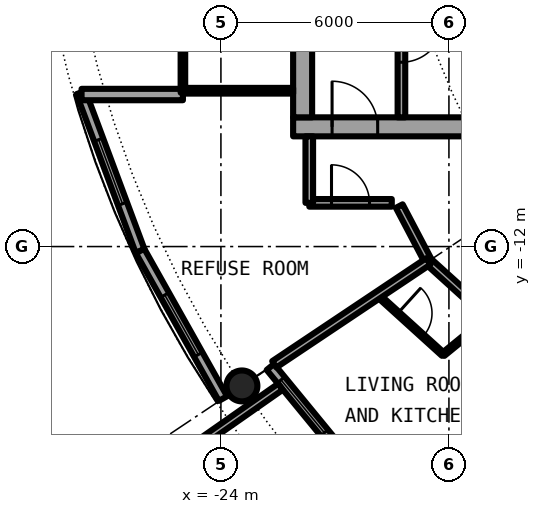
"""IFC4 building model, lengths in metres.
Left out: names, types, materials, properties, quantities, classifications, styles, units other than length and angle.
Written with IfcOpenShell. Run it as: python <this file> out.ifc"""

import sys

from ifc_helpers import new_model, si_unit, direction, frame, frame_2d, origin, origin_2d, place, context, subcontext, project, spatial, rectangle, hollow_circle, extrude, element, fill, save


model = new_model("IFC4")
c1 = context("Model", 3, precision=1e-05, world=origin(), true_north=direction((0.0, 1.0)))
c2 = subcontext(c1, "Body", "Model", "MODEL_VIEW")
j1 = project(units=[si_unit("LENGTHUNIT", "METRE"), si_unit("PLANEANGLEUNIT", "RADIAN")], contexts=[c1])
p1 = place(None, origin())
s1 = spatial("IfcSite", under=j1, at=p1, CompositionType="ELEMENT")
p2 = place(p1, origin())
s2 = spatial("IfcBuilding", under=s1, at=p2, CompositionType="ELEMENT")
p3 = place(p2, frame((0.0, 0.0, 145.2)))
s3 = spatial("IfcBuildingStorey", under=s2, at=p3, CompositionType="ELEMENT", Elevation=145.2)
p4 = place(p3, frame((-23.448, -15.667, 0.0), z_axis=(0.0, 0.0, 1.0), x_axis=(1.0, 0.0, 0.0)))
e1 = element("IfcColumn", 1, at=p4, inside=s3, PredefinedType="COLUMN", context=c2, shape_type="SweptSolid", body=[
    extrude(hollow_circle(Radius=0.406, WallThickness=0.04, at=origin_2d()), origin(), (0.0, 0.0, 1.0), 3.05),
])
p5 = place(p3, frame((-22.699, -15.167, 0.0), z_axis=(0.0, 0.0, 1.0), x_axis=(0.634382322723, -0.773019449054, 0.0)))
e2 = element("IfcWall", 2, at=p5, inside=s3, PredefinedType="SOLIDWALL", context=c2, shape_type="SweptSolid", body=[
    extrude(rectangle(XDim=5.352, YDim=0.25, at=frame_2d((2.676, 0.0))), origin(), (0.0, 0.0, 1.0), 2.7),
])
p6 = place(p5, frame((0.441, 0.0, 0.3)))
e3 = element("IfcOpeningElement", 3, at=p6, cuts=e2, PredefinedType="OPENING", context=c2, shape_type="SweptSolid", body=[
    extrude(rectangle(XDim=1.8, YDim=2.1, at=frame_2d((0.9, 1.05))), frame((0.0, 0.135, 0.0), z_axis=(0.0, -1.0, 0.0), x_axis=(1.0, 0.0, 0.0)), (0.0, 0.0, 1.0), 0.27),
])
p7 = place(p5, frame((3.51, 0.0, 0.0)))
e4 = element("IfcOpeningElement", 4, at=p7, cuts=e2, PredefinedType="OPENING", context=c2, shape_type="SweptSolid", body=[
    extrude(rectangle(XDim=1.0, YDim=2.2, at=frame_2d((0.5, 1.1))), frame((0.0, 0.135, 0.0), z_axis=(0.0, -1.0, 0.0), x_axis=(1.0, 0.0, 0.0)), (0.0, 0.0, 1.0), 0.27),
])
p8 = place(p3, frame((-22.433, -15.688, -0.03), z_axis=(0.0, 0.0, 1.0), x_axis=(-0.819373043115, -0.573260687834, 0.0)))
e5 = element("IfcWall", 5, at=p8, inside=s3, PredefinedType="SOLIDWALL", context=c2, shape_type="SweptSolid", body=[
    extrude(rectangle(XDim=2.925, YDim=0.2, at=frame_2d((1.463, 0.0))), origin(), (0.0, 0.0, 1.0), 2.73),
])
p9 = place(p3, frame((-27.682, -7.945, 0.0), z_axis=(0.0, 0.0, 1.0), x_axis=(0.349247811493, -0.937030397675, 0.0)))
e6 = element("IfcWall", 6, at=p9, inside=s3, PredefinedType="SOLIDWALL", context=c2, shape_type="SweptSolid", body=[
    extrude(rectangle(XDim=4.452, YDim=0.25, at=frame_2d((2.226, 0.0))), origin(), (0.0, 0.0, 1.0), 2.7),
])
p10 = place(p9, frame((1.327, 0.0, 0.3)))
e7 = element("IfcOpeningElement", 7, at=p10, cuts=e6, PredefinedType="OPENING", context=c2, shape_type="SweptSolid", body=[
    extrude(rectangle(XDim=1.8, YDim=2.1, at=frame_2d((0.9, 1.05))), frame((0.0, 0.135, 0.0), z_axis=(0.0, -1.0, 0.0), x_axis=(1.0, 0.0, 0.0)), (0.0, 0.0, 1.0), 0.27),
])
p11 = place(p3, frame((-26.127, -12.117, 0.0), z_axis=(0.0, 0.0, 1.0), x_axis=(0.489696356642, -0.871893042919, 0.0)))
e8 = element("IfcWall", 8, at=p11, inside=s3, PredefinedType="SOLIDWALL", context=c2, shape_type="SweptSolid", body=[
    extrude(rectangle(XDim=4.454, YDim=0.25, at=frame_2d((2.227, 0.0))), origin(), (0.0, 0.0, 1.0), 2.7),
])
p12 = place(p11, frame((1.327, 0.0, 0.3)))
e9 = element("IfcOpeningElement", 9, at=p12, cuts=e8, PredefinedType="OPENING", context=c2, shape_type="SweptSolid", body=[
    extrude(rectangle(XDim=1.8, YDim=2.1, at=frame_2d((0.9, 1.05))), frame((0.0, 0.135, 0.0), z_axis=(0.0, -1.0, 0.0), x_axis=(1.0, 0.0, 0.0)), (0.0, 0.0, 1.0), 0.27),
])
p13 = place(p3, frame((-25.0, -8.0, 0.0), z_axis=(0.0, 0.0, 1.0), x_axis=(-1.0, 0.0, 0.0)))
e10 = element("IfcWall", 10, at=p13, inside=s3, PredefinedType="SOLIDWALL", context=c2, shape_type="SweptSolid", body=[
    extrude(rectangle(XDim=2.667, YDim=0.3, at=frame_2d((1.333, 0.0))), origin(), (0.0, 0.0, 1.0), 2.7),
])
p14 = place(p3, frame((-22.1, -8.85, 0.0), z_axis=(0.0, 0.0, 1.0), x_axis=(1.0, 0.0, 0.0)))
e11 = element("IfcWall", 11, at=p14, inside=s3, PredefinedType="SHEAR", context=c2, shape_type="SweptSolid", body=[
    extrude(rectangle(XDim=13.6, YDim=0.5, at=frame_2d((6.8, 0.0))), origin(), (0.0, 0.0, 1.0), 3.05),
])
p15 = place(p14, frame((1.025, 0.0, 0.0)))
e12 = element("IfcOpeningElement", 12, at=p15, cuts=e11, PredefinedType="OPENING", context=c2, shape_type="SweptSolid", body=[
    extrude(rectangle(XDim=1.2, YDim=2.3, at=frame_2d((0.6, 1.15))), frame((0.0, 0.26, 0.0), z_axis=(0.0, -1.0, 0.0), x_axis=(1.0, 0.0, 0.0)), (0.0, 0.0, 1.0), 0.52),
])
p16 = place(p3, frame((-21.85, -8.6, 0.0), z_axis=(0.0, 0.0, 1.0), x_axis=(0.0, 1.0, 0.0)))
e13 = element("IfcWall", 13, at=p16, inside=s3, PredefinedType="SHEAR", context=c2, shape_type="SweptSolid", body=[
    extrude(rectangle(XDim=17.2, YDim=0.5, at=frame_2d((8.6, 0.0))), origin(), (0.0, 0.0, 1.0), 3.05),
])
p17 = place(p16, frame((7.7, 0.0, 0.0)))
e14 = element("IfcOpeningElement", 14, at=p17, cuts=e13, PredefinedType="OPENING", context=c2, shape_type="SweptSolid", body=[
    extrude(rectangle(XDim=1.8, YDim=2.3, at=frame_2d((0.9, 1.15))), frame((0.0, 0.26, 0.0), z_axis=(0.0, -1.0, 0.0), x_axis=(1.0, 0.0, 0.0)), (0.0, 0.0, 1.0), 0.52),
])
p18 = place(p3, frame((-19.25, -1.575, 0.0), z_axis=(0.0, 0.0, 1.0), x_axis=(0.0, -1.0, 0.0)))
e15 = element("IfcWall", 15, at=p18, inside=s3, PredefinedType="SOLIDWALL", context=c2, shape_type="SweptSolid", body=[
    extrude(rectangle(XDim=7.025, YDim=0.2, at=frame_2d((3.513, 0.0))), origin(), (0.0, 0.0, 1.0), 2.7),
])
p19 = place(p18, frame((4.475, 0.0, 0.0)))
e16 = element("IfcOpeningElement", 16, at=p19, cuts=e15, PredefinedType="OPENING", context=c2, shape_type="SweptSolid", body=[
    extrude(rectangle(XDim=1.1, YDim=2.3, at=frame_2d((0.55, 1.15))), frame((0.0, 0.11, 0.0), z_axis=(0.0, -1.0, 0.0), x_axis=(1.0, 0.0, 0.0)), (0.0, 0.0, 1.0), 0.22),
])
p20 = place(p3, frame((-22.1, -7.9, 0.0), z_axis=(0.0, 0.0, 1.0), x_axis=(-1.0, 0.0, 0.0)))
e17 = element("IfcWall", 17, at=p20, inside=s3, PredefinedType="PARTITIONING", context=c2, shape_type="SweptSolid", body=[
    extrude(rectangle(XDim=2.84, YDim=0.15, at=frame_2d((1.42, 0.0))), origin(), (0.0, 0.0, 1.0), 2.7),
])
p21 = place(p3, frame((-25.0, -7.95, 0.0), z_axis=(0.0, 0.0, 1.0), x_axis=(0.0, 1.0, 0.0)))
e18 = element("IfcWall", 18, at=p21, inside=s3, PredefinedType="PARTITIONING", context=c2, shape_type="SweptSolid", body=[
    extrude(rectangle(XDim=15.9, YDim=0.12, at=frame_2d((7.95, 0.0))), origin(), (0.0, 0.0, 1.0), 2.7),
])
p22 = place(p21, frame((6.75, 0.0, 0.0)))
e19 = element("IfcOpeningElement", 19, at=p22, cuts=e18, PredefinedType="OPENING", context=c2, shape_type="SweptSolid", body=[
    extrude(rectangle(XDim=2.4, YDim=2.3, at=frame_2d((1.2, 1.15))), frame((0.0, 0.07, 0.0), z_axis=(0.0, -1.0, 0.0), x_axis=(1.0, 0.0, 0.0)), (0.0, 0.0, 1.0), 0.14),
])
p23 = place(p21, frame((11.55, 0.0, 0.1)))
e20 = element("IfcOpeningElement", 20, at=p23, cuts=e18, PredefinedType="OPENING", context=c2, shape_type="SweptSolid", body=[
    extrude(rectangle(XDim=3.4, YDim=2.35, at=frame_2d((1.7, 1.175))), frame((0.0, 0.07, 0.0), z_axis=(0.0, -1.0, 0.0), x_axis=(1.0, 0.0, 0.0)), (0.0, 0.0, 1.0), 0.14),
])
p24 = place(p21, frame((0.95, 0.0, 0.1)))
e21 = element("IfcOpeningElement", 21, at=p24, cuts=e18, PredefinedType="OPENING", context=c2, shape_type="SweptSolid", body=[
    extrude(rectangle(XDim=3.4, YDim=2.35, at=frame_2d((1.7, 1.175))), frame((0.0, 0.07, 0.0), z_axis=(0.0, -1.0, 0.0), x_axis=(1.0, 0.0, 0.0)), (0.0, 0.0, 1.0), 0.14),
])
p25 = place(p3, frame((-19.872, -13.278, 0.0), z_axis=(0.0, 0.0, 1.0), x_axis=(0.740990220108, -0.671515817911, 0.0)))
e22 = element("IfcWall", 22, at=p25, inside=s3, PredefinedType="PARTITIONING", context=c2, shape_type="SweptSolid", body=[
    extrude(rectangle(XDim=2.323, YDim=0.1, at=frame_2d((1.161, 0.0))), origin(), (0.0, 0.0, 1.0), 2.7),
])
p26 = place(p25, frame((0.711, 0.0, 0.0)))
e23 = element("IfcOpeningElement", 23, at=p26, cuts=e22, PredefinedType="OPENING", context=c2, shape_type="SweptSolid", body=[
    extrude(rectangle(XDim=0.9, YDim=2.3, at=frame_2d((0.45, 1.15))), frame((0.0, 0.06, 0.0), z_axis=(0.0, -1.0, 0.0), x_axis=(1.0, 0.0, 0.0)), (0.0, 0.0, 1.0), 0.12),
])
p27 = place(p3, frame((-19.307, -10.935, 0.0), z_axis=(0.0, 0.0, 1.0), x_axis=(0.465605550524, -0.884992356646, 0.0)))
e24 = element("IfcWall", 24, at=p27, inside=s3, PredefinedType="PARTITIONING", context=c2, shape_type="SweptSolid", body=[
    extrude(rectangle(XDim=1.643, YDim=0.2, at=frame_2d((0.821, 0.0))), origin(), (0.0, 0.0, 1.0), 2.7),
])
p28 = place(p3, frame((-18.542, -12.389, 0.0), z_axis=(0.0, 0.0, 1.0), x_axis=(0.740947367223, -0.671563101283, 0.0)))
e25 = element("IfcWall", 25, at=p28, inside=s3, PredefinedType="PARTITIONING", context=c2, shape_type="SweptSolid", body=[
    extrude(rectangle(XDim=10.837, YDim=0.2, at=frame_2d((5.419, 0.0))), origin(), (0.0, 0.0, 1.0), 2.7),
])
p29 = place(p28, frame((6.002, 0.0, 0.0)))
e26 = element("IfcOpeningElement", 26, at=p29, cuts=e25, PredefinedType="OPENING", context=c2, shape_type="SweptSolid", body=[
    extrude(rectangle(XDim=1.0, YDim=2.3, at=frame_2d((0.5, 1.15))), frame((0.0, 0.11, 0.0), z_axis=(0.0, -1.0, 0.0), x_axis=(1.0, 0.0, 0.0)), (0.0, 0.0, 1.0), 0.22),
])
p30 = place(p3, frame((-21.675, -10.85, 0.0), z_axis=(0.0, 0.0, 1.0), x_axis=(1.0, 0.0, 0.0)))
e27 = element("IfcWall", 27, at=p30, inside=s3, PredefinedType="PARTITIONING", context=c2, shape_type="SweptSolid", body=[
    extrude(rectangle(XDim=2.171, YDim=0.2, at=frame_2d((1.085, 0.0))), origin(), (0.0, 0.0, 1.0), 2.7),
])
p31 = place(p30, frame((0.585, 0.0, 0.0)))
e28 = element("IfcOpeningElement", 28, at=p31, cuts=e27, PredefinedType="OPENING", context=c2, shape_type="SweptSolid", body=[
    extrude(rectangle(XDim=1.0, YDim=2.3, at=frame_2d((0.5, 1.15))), frame((0.0, 0.11, 0.0), z_axis=(0.0, -1.0, 0.0), x_axis=(1.0, 0.0, 0.0)), (0.0, 0.0, 1.0), 0.22),
])
p32 = place(p3, frame((-22.595, -15.098, 0.0), z_axis=(0.0, 0.0, 1.0), x_axis=(0.831387096605, 0.55569370664, 0.0)))
e29 = element("IfcWall", 29, at=p32, inside=s3, PredefinedType="PARTITIONING", context=c2, shape_type="SweptSolid", body=[
    extrude(rectangle(XDim=4.875, YDim=0.2, at=frame_2d((2.438, 0.0))), origin(), (0.0, 0.0, 1.0), 2.7),
])
p33 = place(p3, frame((-19.234, -19.197, 0.0), z_axis=(0.0, 0.0, 1.0), x_axis=(0.707722727509, 0.706490297858, 0.0)))
e30 = element("IfcWall", 30, at=p33, inside=s3, PredefinedType="PARTITIONING", context=c2, shape_type="SweptSolid", body=[
    extrude(rectangle(XDim=3.962, YDim=0.1, at=frame_2d((1.981, 0.0))), origin(), (0.0, 0.0, 1.0), 2.7),
])
p34 = place(p33, frame((1.531, 0.0, 0.0)))
e31 = element("IfcOpeningElement", 31, at=p34, cuts=e30, PredefinedType="OPENING", context=c2, shape_type="SweptSolid", body=[
    extrude(rectangle(XDim=0.9, YDim=2.3, at=frame_2d((0.45, 1.15))), frame((0.0, 0.06, 0.0), z_axis=(0.0, -1.0, 0.0), x_axis=(1.0, 0.0, 0.0)), (0.0, 0.0, 1.0), 0.12),
])
p35 = place(p3, frame((-18.151, -14.838, 0.0), z_axis=(0.0, 0.0, 1.0), x_axis=(0.774283039722, 0.632839453889, 0.0)))
e32 = element("IfcWall", 32, at=p35, inside=s3, PredefinedType="PARTITIONING", context=c2, shape_type="SweptSolid", body=[
    extrude(rectangle(XDim=1.569, YDim=0.1, at=frame_2d((0.785, 0.0))), origin(), (0.0, 0.0, 1.0), 2.7),
])
p36 = place(p3, frame((-21.675, -10.85, 0.0), z_axis=(0.0, 0.0, 1.0), x_axis=(0.0, 1.0, 0.0)))
e33 = element("IfcWall", 33, at=p36, inside=s3, PredefinedType="PARTITIONING", context=c2, shape_type="SweptSolid", body=[
    extrude(rectangle(XDim=1.75, YDim=0.2, at=frame_2d((0.875, 0.0))), origin(), (0.0, 0.0, 1.0), 2.7),
])
p37 = place(p6, origin())
e34 = element("IfcWindow", 34, at=p37, inside=s3, PartitioningType="SINGLE_PANEL", PredefinedType="WINDOW", context=c2, shape_type="SweptSolid", body=[
    extrude(rectangle(XDim=1.8, YDim=2.1, at=frame_2d((0.9, 1.05))), frame((0.0, 0.03, 0.0), z_axis=(0.0, -1.0, 0.0), x_axis=(1.0, 0.0, 0.0)), (0.0, 0.0, 1.0), 0.06),
])
fill(e3, e34)
p38 = place(p10, origin())
e35 = element("IfcWindow", 35, at=p38, inside=s3, PartitioningType="SINGLE_PANEL", PredefinedType="WINDOW", context=c2, shape_type="SweptSolid", body=[
    extrude(rectangle(XDim=1.8, YDim=2.1, at=frame_2d((0.9, 1.05))), frame((0.0, 0.03, 0.0), z_axis=(0.0, -1.0, 0.0), x_axis=(1.0, 0.0, 0.0)), (0.0, 0.0, 1.0), 0.06),
])
fill(e7, e35)
p39 = place(p12, origin())
e36 = element("IfcWindow", 36, at=p39, inside=s3, PartitioningType="SINGLE_PANEL", PredefinedType="WINDOW", context=c2, shape_type="SweptSolid", body=[
    extrude(rectangle(XDim=1.8, YDim=2.1, at=frame_2d((0.9, 1.05))), frame((0.0, 0.03, 0.0), z_axis=(0.0, -1.0, 0.0), x_axis=(1.0, 0.0, 0.0)), (0.0, 0.0, 1.0), 0.06),
])
fill(e9, e36)
p40 = place(p19, origin())
e37 = element("IfcDoor", 37, at=p40, inside=s3, OperationType="SINGLE_SWING_LEFT", PredefinedType="DOOR", context=c2, shape_type="SweptSolid", body=[
    extrude(rectangle(XDim=1.1, YDim=2.3, at=frame_2d((0.55, 1.15))), frame((0.0, 0.025, 0.0), z_axis=(0.0, -1.0, 0.0), x_axis=(1.0, 0.0, 0.0)), (0.0, 0.0, 1.0), 0.05),
])
fill(e16, e37)
p41 = place(p15, origin())
e38 = element("IfcDoor", 38, at=p41, inside=s3, OperationType="SINGLE_SWING_RIGHT", PredefinedType="DOOR", context=c2, shape_type="SweptSolid", body=[
    extrude(rectangle(XDim=1.2, YDim=2.3, at=frame_2d((0.6, 1.15))), frame((0.0, 0.025, 0.0), z_axis=(0.0, -1.0, 0.0), x_axis=(1.0, 0.0, 0.0)), (0.0, 0.0, 1.0), 0.05),
])
fill(e12, e38)
p42 = place(p24, origin())
e39 = element("IfcWindow", 39, at=p42, inside=s3, PartitioningType="SINGLE_PANEL", PredefinedType="WINDOW", context=c2, shape_type="SweptSolid", body=[
    extrude(rectangle(XDim=3.4, YDim=2.35, at=frame_2d((1.7, 1.175))), frame((0.0, 0.03, 0.0), z_axis=(0.0, -1.0, 0.0), x_axis=(1.0, 0.0, 0.0)), (0.0, 0.0, 1.0), 0.06),
])
fill(e21, e39)
p43 = place(p26, origin())
e40 = element("IfcDoor", 40, at=p43, inside=s3, OperationType="SINGLE_SWING_RIGHT", PredefinedType="DOOR", context=c2, shape_type="SweptSolid", body=[
    extrude(rectangle(XDim=0.9, YDim=2.3, at=frame_2d((0.45, 1.15))), frame((0.0, 0.025, 0.0), z_axis=(0.0, -1.0, 0.0), x_axis=(1.0, 0.0, 0.0)), (0.0, 0.0, 1.0), 0.05),
])
fill(e23, e40)
p44 = place(p31, origin())
e41 = element("IfcDoor", 41, at=p44, inside=s3, OperationType="SINGLE_SWING_LEFT", PredefinedType="DOOR", context=c2, shape_type="SweptSolid", body=[
    extrude(rectangle(XDim=1.0, YDim=2.3, at=frame_2d((0.5, 1.15))), frame((0.0, 0.025, 0.0), z_axis=(0.0, -1.0, 0.0), x_axis=(1.0, 0.0, 0.0)), (0.0, 0.0, 1.0), 0.05),
])
fill(e28, e41)
save(model, sys.argv[1])
